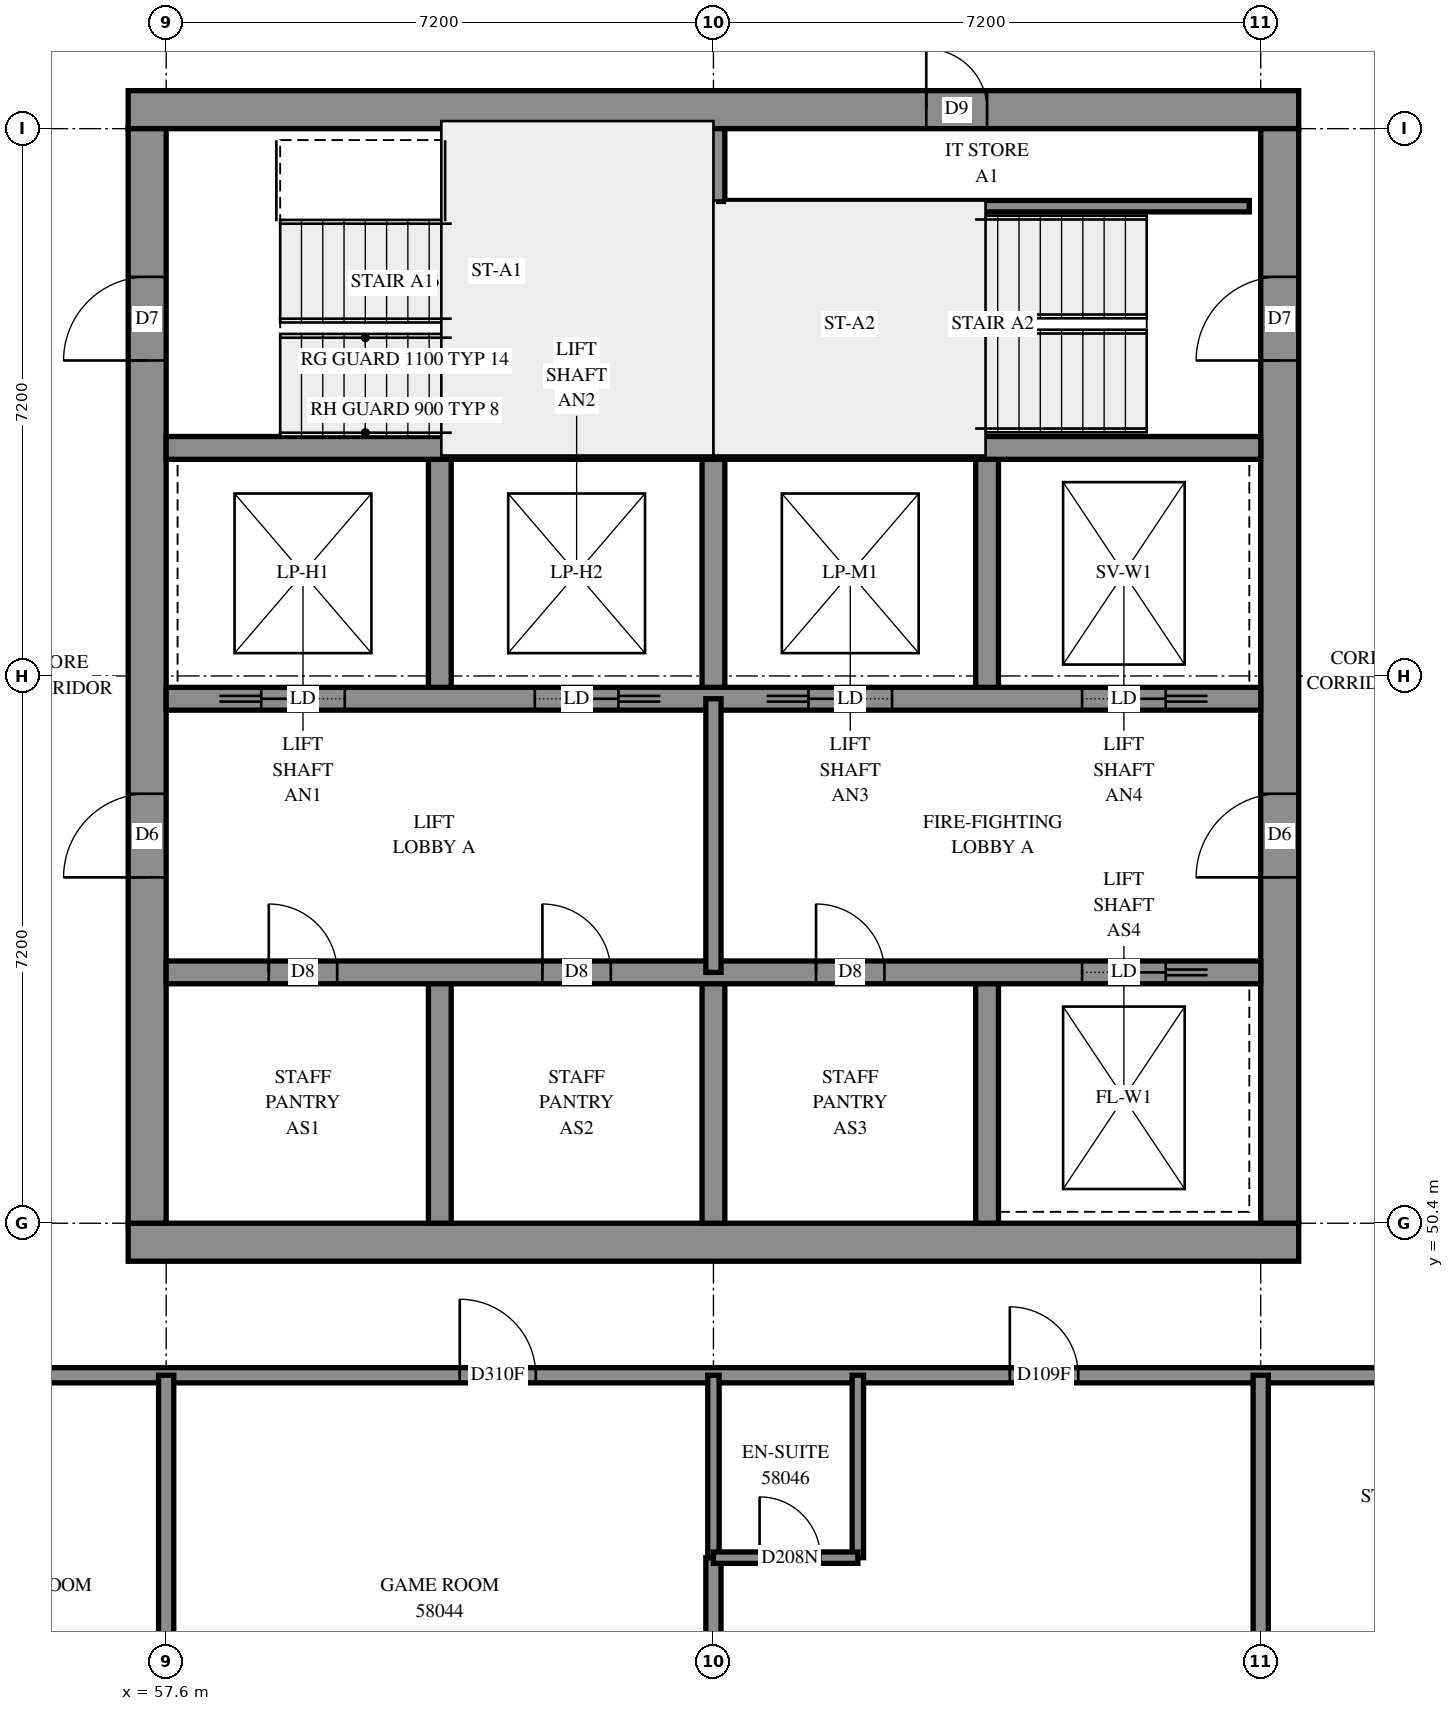
"""IFC4 building model, lengths in metres.
Left out: names, types, materials, properties, quantities, classifications, styles, units other than length and angle.
Written with IfcOpenShell. Run it as: python <this file> out.ifc"""

import sys

from ifc_helpers import new_model, si_unit, direction, frame, frame_2d, origin, place, context, subcontext, project, spatial, rectangle, extrude, element, fill, save


model = new_model("IFC4")
c1 = context("Model", 3, precision=1e-05, world=origin(), true_north=direction((0.0, 1.0)))
c2 = subcontext(c1, "Body", "Model", "MODEL_VIEW")
j1 = project(units=[si_unit("LENGTHUNIT", "METRE"), si_unit("PLANEANGLEUNIT", "RADIAN")], contexts=[c1])
p1 = place(None, origin())
s1 = spatial("IfcSite", under=j1, at=p1, CompositionType="ELEMENT")
p2 = place(p1, origin())
s2 = spatial("IfcBuilding", under=s1, at=p2, CompositionType="ELEMENT")
p3 = place(p2, frame((0.0, 0.0, 213.4)))
s3 = spatial("IfcBuildingStorey", under=s2, at=p3, CompositionType="ELEMENT", Elevation=213.4)
p4 = place(p3, frame((57.1, 50.15, -0.3), z_axis=(0.0, 0.0, 1.0), x_axis=(1.0, 0.0, 0.0)))
e1 = element("IfcWall", 1, at=p4, inside=s3, PredefinedType="SHEAR", context=c2, shape_type="SweptSolid", body=[
    extrude(rectangle(XDim=15.4, YDim=0.5, at=frame_2d((7.7, 0.0))), origin(), (0.0, 0.0, 1.0), 2.7),
])
p5 = place(p3, frame((57.1, 65.05, -0.3), z_axis=(0.0, 0.0, 1.0), x_axis=(1.0, 0.0, 0.0)))
e2 = element("IfcWall", 2, at=p5, inside=s3, PredefinedType="SHEAR", context=c2, shape_type="SweptSolid", body=[
    extrude(rectangle(XDim=15.4, YDim=0.5, at=frame_2d((7.7, 0.0))), origin(), (0.0, 0.0, 1.0), 2.7),
])
p6 = place(p5, frame((10.5, 0.0, 0.3)))
e3 = element("IfcOpeningElement", 3, at=p6, cuts=e2, PredefinedType="OPENING", context=c2, shape_type="SweptSolid", body=[
    extrude(rectangle(XDim=0.8, YDim=2.1, at=frame_2d((0.4, 1.05))), frame((0.0, 0.26, 0.0), z_axis=(0.0, -1.0, 0.0), x_axis=(1.0, 0.0, 0.0)), (0.0, 0.0, 1.0), 0.52),
])
p7 = place(p3, frame((57.35, 50.4, -0.3), z_axis=(0.0, 0.0, 1.0), x_axis=(0.0, 1.0, 0.0)))
e4 = element("IfcWall", 4, at=p7, inside=s3, PredefinedType="SHEAR", context=c2, shape_type="SweptSolid", body=[
    extrude(rectangle(XDim=14.4, YDim=0.5, at=frame_2d((7.2, 0.0))), origin(), (0.0, 0.0, 1.0), 2.7),
])
p8 = place(p7, frame((4.55, 0.0, 0.3)))
e5 = element("IfcOpeningElement", 5, at=p8, cuts=e4, PredefinedType="OPENING", context=c2, shape_type="SweptSolid", body=[
    extrude(rectangle(XDim=1.1, YDim=2.1, at=frame_2d((0.55, 1.05))), frame((0.0, 0.26, 0.0), z_axis=(0.0, -1.0, 0.0), x_axis=(1.0, 0.0, 0.0)), (0.0, 0.0, 1.0), 0.52),
])
p9 = place(p7, frame((11.35, 0.0, 0.3)))
e6 = element("IfcOpeningElement", 6, at=p9, cuts=e4, PredefinedType="OPENING", context=c2, shape_type="SweptSolid", body=[
    extrude(rectangle(XDim=1.1, YDim=2.1, at=frame_2d((0.55, 1.05))), frame((0.0, 0.26, 0.0), z_axis=(0.0, -1.0, 0.0), x_axis=(1.0, 0.0, 0.0)), (0.0, 0.0, 1.0), 0.52),
])
p10 = place(p3, frame((72.25, 50.4, -0.3), z_axis=(0.0, 0.0, 1.0), x_axis=(0.0, 1.0, 0.0)))
e7 = element("IfcWall", 7, at=p10, inside=s3, PredefinedType="SHEAR", context=c2, shape_type="SweptSolid", body=[
    extrude(rectangle(XDim=14.4, YDim=0.5, at=frame_2d((7.2, 0.0))), origin(), (0.0, 0.0, 1.0), 2.7),
])
p11 = place(p10, frame((4.55, 0.0, 0.3)))
e8 = element("IfcOpeningElement", 8, at=p11, cuts=e7, PredefinedType="OPENING", context=c2, shape_type="SweptSolid", body=[
    extrude(rectangle(XDim=1.1, YDim=2.1, at=frame_2d((0.55, 1.05))), frame((0.0, 0.26, 0.0), z_axis=(0.0, -1.0, 0.0), x_axis=(1.0, 0.0, 0.0)), (0.0, 0.0, 1.0), 0.52),
])
p12 = place(p10, frame((11.35, 0.0, 0.3)))
e9 = element("IfcOpeningElement", 9, at=p12, cuts=e7, PredefinedType="OPENING", context=c2, shape_type="SweptSolid", body=[
    extrude(rectangle(XDim=1.1, YDim=2.1, at=frame_2d((0.55, 1.05))), frame((0.0, 0.26, 0.0), z_axis=(0.0, -1.0, 0.0), x_axis=(1.0, 0.0, 0.0)), (0.0, 0.0, 1.0), 0.52),
])
for number, where, z_axis, x_axis in (
    (10, (61.2, 50.4, 0.0), (0.0, 0.0, 1.0), (0.0, 1.0, 0.0)),
    (11, (61.2, 57.3, 0.0), (0.0, 0.0, 1.0), (0.0, 1.0, 0.0)),
    (12, (64.8, 50.4, 0.0), (0.0, 0.0, 1.0), (0.0, 1.0, 0.0)),
    (13, (64.8, 57.3, 0.0), (0.0, 0.0, 1.0), (0.0, 1.0, 0.0)),
    (14, (68.4, 50.4, 0.0), (0.0, 0.0, 1.0), (0.0, 1.0, 0.0)),
    (15, (68.4, 57.3, 0.0), (0.0, 0.0, 1.0), (0.0, 1.0, 0.0)),
):
    element("IfcWall", number, at=place(p3, frame(where, z_axis=z_axis, x_axis=x_axis)), inside=s3, PredefinedType="SOLIDWALL", context=c2, shape_type="SweptSolid", body=[
        extrude(rectangle(XDim=3.3, YDim=0.3, at=frame_2d((1.65, 0.0))), origin(), (0.0, 0.0, 1.0), 3.1),
    ])
p13 = place(p3, frame((57.6, 53.7, 0.0), z_axis=(0.0, 0.0, 1.0), x_axis=(1.0, 0.0, 0.0)))
e16 = element("IfcWall", 16, at=p13, inside=s3, PredefinedType="SOLIDWALL", context=c2, shape_type="SweptSolid", body=[
    extrude(rectangle(XDim=14.4, YDim=0.3, at=frame_2d((7.2, 0.0))), origin(), (0.0, 0.0, 1.0), 3.1),
])
p14 = place(p13, frame((1.35, 0.0, 0.0)))
e17 = element("IfcOpeningElement", 17, at=p14, cuts=e16, PredefinedType="OPENING", context=c2, shape_type="SweptSolid", body=[
    extrude(rectangle(XDim=0.9, YDim=2.1, at=frame_2d((0.45, 1.05))), frame((0.0, 0.16, 0.0), z_axis=(0.0, -1.0, 0.0), x_axis=(1.0, 0.0, 0.0)), (0.0, 0.0, 1.0), 0.32),
])
p15 = place(p13, frame((4.95, 0.0, 0.0)))
e18 = element("IfcOpeningElement", 18, at=p15, cuts=e16, PredefinedType="OPENING", context=c2, shape_type="SweptSolid", body=[
    extrude(rectangle(XDim=0.9, YDim=2.1, at=frame_2d((0.45, 1.05))), frame((0.0, 0.16, 0.0), z_axis=(0.0, -1.0, 0.0), x_axis=(1.0, 0.0, 0.0)), (0.0, 0.0, 1.0), 0.32),
])
p16 = place(p13, frame((8.55, 0.0, 0.0)))
e19 = element("IfcOpeningElement", 19, at=p16, cuts=e16, PredefinedType="OPENING", context=c2, shape_type="SweptSolid", body=[
    extrude(rectangle(XDim=0.9, YDim=2.1, at=frame_2d((0.45, 1.05))), frame((0.0, 0.16, 0.0), z_axis=(0.0, -1.0, 0.0), x_axis=(1.0, 0.0, 0.0)), (0.0, 0.0, 1.0), 0.32),
])
p17 = place(p13, frame((12.05, 0.0, 0.0)))
e20 = element("IfcOpeningElement", 20, at=p17, cuts=e16, PredefinedType="OPENING", context=c2, shape_type="SweptSolid", body=[
    extrude(rectangle(XDim=1.1, YDim=2.1, at=frame_2d((0.55, 1.05))), frame((0.0, 0.16, 0.0), z_axis=(0.0, -1.0, 0.0), x_axis=(1.0, 0.0, 0.0)), (0.0, 0.0, 1.0), 0.32),
])
p18 = place(p3, frame((57.6, 57.3, 0.0), z_axis=(0.0, 0.0, 1.0), x_axis=(1.0, 0.0, 0.0)))
e21 = element("IfcWall", 21, at=p18, inside=s3, PredefinedType="SOLIDWALL", context=c2, shape_type="SweptSolid", body=[
    extrude(rectangle(XDim=14.4, YDim=0.3, at=frame_2d((7.2, 0.0))), origin(), (0.0, 0.0, 1.0), 3.1),
])
p19 = place(p18, frame((1.25, 0.0, 0.0)))
e22 = element("IfcOpeningElement", 22, at=p19, cuts=e21, PredefinedType="OPENING", context=c2, shape_type="SweptSolid", body=[
    extrude(rectangle(XDim=1.1, YDim=2.1, at=frame_2d((0.55, 1.05))), frame((0.0, 0.16, 0.0), z_axis=(0.0, -1.0, 0.0), x_axis=(1.0, 0.0, 0.0)), (0.0, 0.0, 1.0), 0.32),
])
p20 = place(p18, frame((4.85, 0.0, 0.0)))
e23 = element("IfcOpeningElement", 23, at=p20, cuts=e21, PredefinedType="OPENING", context=c2, shape_type="SweptSolid", body=[
    extrude(rectangle(XDim=1.1, YDim=2.1, at=frame_2d((0.55, 1.05))), frame((0.0, 0.16, 0.0), z_axis=(0.0, -1.0, 0.0), x_axis=(1.0, 0.0, 0.0)), (0.0, 0.0, 1.0), 0.32),
])
p21 = place(p18, frame((8.45, 0.0, 0.0)))
e24 = element("IfcOpeningElement", 24, at=p21, cuts=e21, PredefinedType="OPENING", context=c2, shape_type="SweptSolid", body=[
    extrude(rectangle(XDim=1.1, YDim=2.1, at=frame_2d((0.55, 1.05))), frame((0.0, 0.16, 0.0), z_axis=(0.0, -1.0, 0.0), x_axis=(1.0, 0.0, 0.0)), (0.0, 0.0, 1.0), 0.32),
])
p22 = place(p18, frame((12.05, 0.0, 0.0)))
e25 = element("IfcOpeningElement", 25, at=p22, cuts=e21, PredefinedType="OPENING", context=c2, shape_type="SweptSolid", body=[
    extrude(rectangle(XDim=1.1, YDim=2.1, at=frame_2d((0.55, 1.05))), frame((0.0, 0.16, 0.0), z_axis=(0.0, -1.0, 0.0), x_axis=(1.0, 0.0, 0.0)), (0.0, 0.0, 1.0), 0.32),
])
for number, where, z_axis, x_axis in (
    (26, (57.6, 60.6, 0.0), (0.0, 0.0, 1.0), (1.0, 0.0, 0.0)),
    (27, (64.8, 60.6, 0.0), (0.0, 0.0, 1.0), (1.0, 0.0, 0.0)),
):
    element("IfcWall", number, at=place(p3, frame(where, z_axis=z_axis, x_axis=x_axis)), inside=s3, PredefinedType="SOLIDWALL", context=c2, shape_type="SweptSolid", body=[
        extrude(rectangle(XDim=7.2, YDim=0.3, at=frame_2d((3.6, 0.0))), origin(), (0.0, 0.0, 1.0), 3.1),
    ])
p23 = place(p3, frame((64.8, 60.6, 0.0), z_axis=(0.0, 0.0, 1.0), x_axis=(0.0, 1.0, 0.0)))
e28 = element("IfcWall", 28, at=p23, inside=s3, PredefinedType="SOLIDWALL", context=c2, shape_type="SweptSolid", body=[
    extrude(rectangle(XDim=4.2, YDim=0.3, at=frame_2d((2.1, 0.0))), origin(), (0.0, 0.0, 1.0), 3.1),
])
p24 = place(p3, frame((64.95, 63.78, 0.0), z_axis=(0.0, 0.0, 1.0), x_axis=(1.0, 0.0, 0.0)))
e29 = element("IfcWall", 29, at=p24, inside=s3, PredefinedType="PARTITIONING", context=c2, shape_type="SweptSolid", body=[
    extrude(rectangle(XDim=6.9, YDim=0.15, at=frame_2d((3.45, 0.0))), origin(), (0.0, 0.0, 1.0), 3.1),
])
p25 = place(p3, frame((64.8, 53.7, 0.0), z_axis=(0.0, 0.0, 1.0), x_axis=(0.0, 1.0, 0.0)))
e30 = element("IfcWall", 30, at=p25, inside=s3, PredefinedType="PARTITIONING", context=c2, shape_type="SweptSolid", body=[
    extrude(rectangle(XDim=3.6, YDim=0.2, at=frame_2d((1.8, 0.0))), origin(), (0.0, 0.0, 1.0), 3.1),
])
p26 = place(p3, frame((55.6, 48.4, 0.0), z_axis=(0.0, 0.0, 1.0), x_axis=(1.0, 0.0, 0.0)))
e31 = element("IfcWall", 31, at=p26, inside=s3, PredefinedType="PARTITIONING", context=c2, shape_type="SweptSolid", body=[
    extrude(rectangle(XDim=18.4, YDim=0.2, at=frame_2d((9.2, 0.0))), origin(), (0.0, 0.0, 1.0), 3.1),
])
p27 = place(p26, frame((5.862, 0.0, 0.0)))
e32 = element("IfcOpeningElement", 32, at=p27, cuts=e31, PredefinedType="OPENING", context=c2, shape_type="SweptSolid", body=[
    extrude(rectangle(XDim=1.0, YDim=2.1, at=frame_2d((0.5, 1.05))), frame((0.0, 0.11, 0.0), z_axis=(0.0, -1.0, 0.0), x_axis=(1.0, 0.0, 0.0)), (0.0, 0.0, 1.0), 0.22),
])
p28 = place(p26, frame((13.099, 0.0, 0.0)))
e33 = element("IfcOpeningElement", 33, at=p28, cuts=e31, PredefinedType="OPENING", context=c2, shape_type="SweptSolid", body=[
    extrude(rectangle(XDim=0.9, YDim=2.1, at=frame_2d((0.45, 1.05))), frame((0.0, 0.11, 0.0), z_axis=(0.0, -1.0, 0.0), x_axis=(1.0, 0.0, 0.0)), (0.0, 0.0, 1.0), 0.22),
])
for number, where, z_axis, x_axis in (
    (34, (57.6, 43.6, 0.0), (0.0, 0.0, 1.0), (0.0, 1.0, 0.0)),
    (35, (72.0, 43.6, 0.0), (0.0, 0.0, 1.0), (0.0, 1.0, 0.0)),
):
    element("IfcWall", number, at=place(p3, frame(where, z_axis=z_axis, x_axis=x_axis)), inside=s3, PredefinedType="PARTITIONING", context=c2, shape_type="SweptSolid", body=[
        extrude(rectangle(XDim=4.8, YDim=0.2, at=frame_2d((2.4, 0.0))), origin(), (0.0, 0.0, 1.0), 3.1),
    ])
p29 = place(p3, frame((64.8, 43.6, 0.0), z_axis=(0.0, 0.0, 1.0), x_axis=(0.0, 1.0, 0.0)))
e36 = element("IfcWall", 36, at=p29, inside=s3, PredefinedType="PARTITIONING", context=c2, shape_type="SweptSolid", body=[
    extrude(rectangle(XDim=2.4, YDim=0.2, at=frame_2d((1.2, 0.0))), origin(), (0.0, 0.0, 1.0), 3.1),
])
for number, where, z_axis, x_axis in (
    (37, (66.7, 46.0, 0.0), (0.0, 0.0, 1.0), (0.0, 1.0, 0.0)),
    (38, (64.8, 46.0, 0.0), (0.0, 0.0, 1.0), (0.0, 1.0, 0.0)),
):
    element("IfcWall", number, at=place(p3, frame(where, z_axis=z_axis, x_axis=x_axis)), inside=s3, PredefinedType="PARTITIONING", context=c2, shape_type="SweptSolid", body=[
        extrude(rectangle(XDim=2.4, YDim=0.15, at=frame_2d((1.2, 0.0))), origin(), (0.0, 0.0, 1.0), 3.1),
    ])
p30 = place(p3, frame((64.8, 46.0, 0.0), z_axis=(0.0, 0.0, 1.0), x_axis=(1.0, 0.0, 0.0)))
e39 = element("IfcWall", 39, at=p30, inside=s3, PredefinedType="PARTITIONING", context=c2, shape_type="SweptSolid", body=[
    extrude(rectangle(XDim=1.9, YDim=0.15, at=frame_2d((0.95, 0.0))), origin(), (0.0, 0.0, 1.0), 3.1),
])
p31 = place(p30, frame((0.607, 0.0, 0.0)))
e40 = element("IfcOpeningElement", 40, at=p31, cuts=e39, PredefinedType="OPENING", context=c2, shape_type="SweptSolid", body=[
    extrude(rectangle(XDim=0.8, YDim=2.1, at=frame_2d((0.4, 1.05))), frame((0.0, 0.085, 0.0), z_axis=(0.0, -1.0, 0.0), x_axis=(1.0, 0.0, 0.0)), (0.0, 0.0, 1.0), 0.17),
])
p32 = place(p6, origin())
e41 = element("IfcDoor", 41, at=p32, inside=s3, OperationType="SINGLE_SWING_RIGHT", PredefinedType="DOOR", context=c2, shape_type="SweptSolid", body=[
    extrude(rectangle(XDim=0.8, YDim=2.1, at=frame_2d((0.4, 1.05))), frame((0.0, 0.025, 0.0), z_axis=(0.0, -1.0, 0.0), x_axis=(1.0, 0.0, 0.0)), (0.0, 0.0, 1.0), 0.05),
])
fill(e3, e41)
p33 = place(p8, origin())
e42 = element("IfcDoor", 42, at=p33, inside=s3, OperationType="DOUBLE_DOOR_SINGLE_SWING", PredefinedType="DOOR", context=c2, shape_type="SweptSolid", body=[
    extrude(rectangle(XDim=1.1, YDim=2.1, at=frame_2d((0.55, 1.05))), frame((0.0, 0.025, 0.0), z_axis=(0.0, -1.0, 0.0), x_axis=(1.0, 0.0, 0.0)), (0.0, 0.0, 1.0), 0.05),
])
fill(e5, e42)
p34 = place(p11, origin())
e43 = element("IfcDoor", 43, at=p34, inside=s3, OperationType="DOUBLE_DOOR_SINGLE_SWING", PredefinedType="DOOR", context=c2, shape_type="SweptSolid", body=[
    extrude(rectangle(XDim=1.1, YDim=2.1, at=frame_2d((0.55, 1.05))), frame((0.0, 0.025, 0.0), z_axis=(0.0, -1.0, 0.0), x_axis=(1.0, 0.0, 0.0)), (0.0, 0.0, 1.0), 0.05),
])
fill(e8, e43)
p35 = place(p9, origin())
e44 = element("IfcDoor", 44, at=p35, inside=s3, OperationType="SINGLE_SWING_LEFT", PredefinedType="DOOR", context=c2, shape_type="SweptSolid", body=[
    extrude(rectangle(XDim=1.1, YDim=2.1, at=frame_2d((0.55, 1.05))), frame((0.0, 0.025, 0.0), z_axis=(0.0, -1.0, 0.0), x_axis=(1.0, 0.0, 0.0)), (0.0, 0.0, 1.0), 0.05),
])
fill(e6, e44)
p36 = place(p12, origin())
e45 = element("IfcDoor", 45, at=p36, inside=s3, OperationType="SINGLE_SWING_RIGHT", PredefinedType="DOOR", context=c2, shape_type="SweptSolid", body=[
    extrude(rectangle(XDim=1.1, YDim=2.1, at=frame_2d((0.55, 1.05))), frame((0.0, 0.025, 0.0), z_axis=(0.0, -1.0, 0.0), x_axis=(1.0, 0.0, 0.0)), (0.0, 0.0, 1.0), 0.05),
])
fill(e9, e45)
p37 = place(p14, origin())
e46 = element("IfcDoor", 46, at=p37, inside=s3, OperationType="SINGLE_SWING_LEFT", PredefinedType="DOOR", context=c2, shape_type="SweptSolid", body=[
    extrude(rectangle(XDim=0.9, YDim=2.1, at=frame_2d((0.45, 1.05))), frame((0.0, 0.025, 0.0), z_axis=(0.0, -1.0, 0.0), x_axis=(1.0, 0.0, 0.0)), (0.0, 0.0, 1.0), 0.05),
])
fill(e17, e46)
p38 = place(p15, origin())
e47 = element("IfcDoor", 47, at=p38, inside=s3, OperationType="SINGLE_SWING_LEFT", PredefinedType="DOOR", context=c2, shape_type="SweptSolid", body=[
    extrude(rectangle(XDim=0.9, YDim=2.1, at=frame_2d((0.45, 1.05))), frame((0.0, 0.025, 0.0), z_axis=(0.0, -1.0, 0.0), x_axis=(1.0, 0.0, 0.0)), (0.0, 0.0, 1.0), 0.05),
])
fill(e18, e47)
p39 = place(p16, origin())
e48 = element("IfcDoor", 48, at=p39, inside=s3, OperationType="SINGLE_SWING_LEFT", PredefinedType="DOOR", context=c2, shape_type="SweptSolid", body=[
    extrude(rectangle(XDim=0.9, YDim=2.1, at=frame_2d((0.45, 1.05))), frame((0.0, 0.025, 0.0), z_axis=(0.0, -1.0, 0.0), x_axis=(1.0, 0.0, 0.0)), (0.0, 0.0, 1.0), 0.05),
])
fill(e19, e48)
p40 = place(p17, origin())
e49 = element("IfcDoor", 49, at=p40, inside=s3, OperationType="SLIDING_TO_RIGHT", PredefinedType="DOOR", context=c2, shape_type="SweptSolid", body=[
    extrude(rectangle(XDim=1.1, YDim=2.1, at=frame_2d((0.55, 1.05))), frame((0.0, 0.025, 0.0), z_axis=(0.0, -1.0, 0.0), x_axis=(1.0, 0.0, 0.0)), (0.0, 0.0, 1.0), 0.05),
])
fill(e20, e49)
p41 = place(p19, origin())
e50 = element("IfcDoor", 50, at=p41, inside=s3, OperationType="SLIDING_TO_LEFT", PredefinedType="DOOR", context=c2, shape_type="SweptSolid", body=[
    extrude(rectangle(XDim=1.1, YDim=2.1, at=frame_2d((0.55, 1.05))), frame((0.0, 0.025, 0.0), z_axis=(0.0, -1.0, 0.0), x_axis=(1.0, 0.0, 0.0)), (0.0, 0.0, 1.0), 0.05),
])
fill(e22, e50)
p42 = place(p20, origin())
e51 = element("IfcDoor", 51, at=p42, inside=s3, OperationType="SLIDING_TO_RIGHT", PredefinedType="DOOR", context=c2, shape_type="SweptSolid", body=[
    extrude(rectangle(XDim=1.1, YDim=2.1, at=frame_2d((0.55, 1.05))), frame((0.0, 0.025, 0.0), z_axis=(0.0, -1.0, 0.0), x_axis=(1.0, 0.0, 0.0)), (0.0, 0.0, 1.0), 0.05),
])
fill(e23, e51)
p43 = place(p21, origin())
e52 = element("IfcDoor", 52, at=p43, inside=s3, OperationType="SLIDING_TO_LEFT", PredefinedType="DOOR", context=c2, shape_type="SweptSolid", body=[
    extrude(rectangle(XDim=1.1, YDim=2.1, at=frame_2d((0.55, 1.05))), frame((0.0, 0.025, 0.0), z_axis=(0.0, -1.0, 0.0), x_axis=(1.0, 0.0, 0.0)), (0.0, 0.0, 1.0), 0.05),
])
fill(e24, e52)
p44 = place(p22, origin())
e53 = element("IfcDoor", 53, at=p44, inside=s3, OperationType="SLIDING_TO_RIGHT", PredefinedType="DOOR", context=c2, shape_type="SweptSolid", body=[
    extrude(rectangle(XDim=1.1, YDim=2.1, at=frame_2d((0.55, 1.05))), frame((0.0, 0.025, 0.0), z_axis=(0.0, -1.0, 0.0), x_axis=(1.0, 0.0, 0.0)), (0.0, 0.0, 1.0), 0.05),
])
fill(e25, e53)
p45 = place(p27, origin())
e54 = element("IfcDoor", 54, at=p45, inside=s3, OperationType="SINGLE_SWING_LEFT", PredefinedType="DOOR", context=c2, shape_type="SweptSolid", body=[
    extrude(rectangle(XDim=1.0, YDim=2.1, at=frame_2d((0.5, 1.05))), frame((0.0, 0.025, 0.0), z_axis=(0.0, -1.0, 0.0), x_axis=(1.0, 0.0, 0.0)), (0.0, 0.0, 1.0), 0.05),
])
fill(e32, e54)
p46 = place(p28, origin())
e55 = element("IfcDoor", 55, at=p46, inside=s3, OperationType="SINGLE_SWING_LEFT", PredefinedType="DOOR", context=c2, shape_type="SweptSolid", body=[
    extrude(rectangle(XDim=0.9, YDim=2.1, at=frame_2d((0.45, 1.05))), frame((0.0, 0.025, 0.0), z_axis=(0.0, -1.0, 0.0), x_axis=(1.0, 0.0, 0.0)), (0.0, 0.0, 1.0), 0.05),
])
fill(e33, e55)
p47 = place(p31, origin())
e56 = element("IfcDoor", 56, at=p47, inside=s3, OperationType="SINGLE_SWING_RIGHT", PredefinedType="DOOR", context=c2, shape_type="SweptSolid", body=[
    extrude(rectangle(XDim=0.8, YDim=2.1, at=frame_2d((0.4, 1.05))), frame((0.0, 0.025, 0.0), z_axis=(0.0, -1.0, 0.0), x_axis=(1.0, 0.0, 0.0)), (0.0, 0.0, 1.0), 0.05),
])
fill(e40, e56)
save(model, sys.argv[1])
